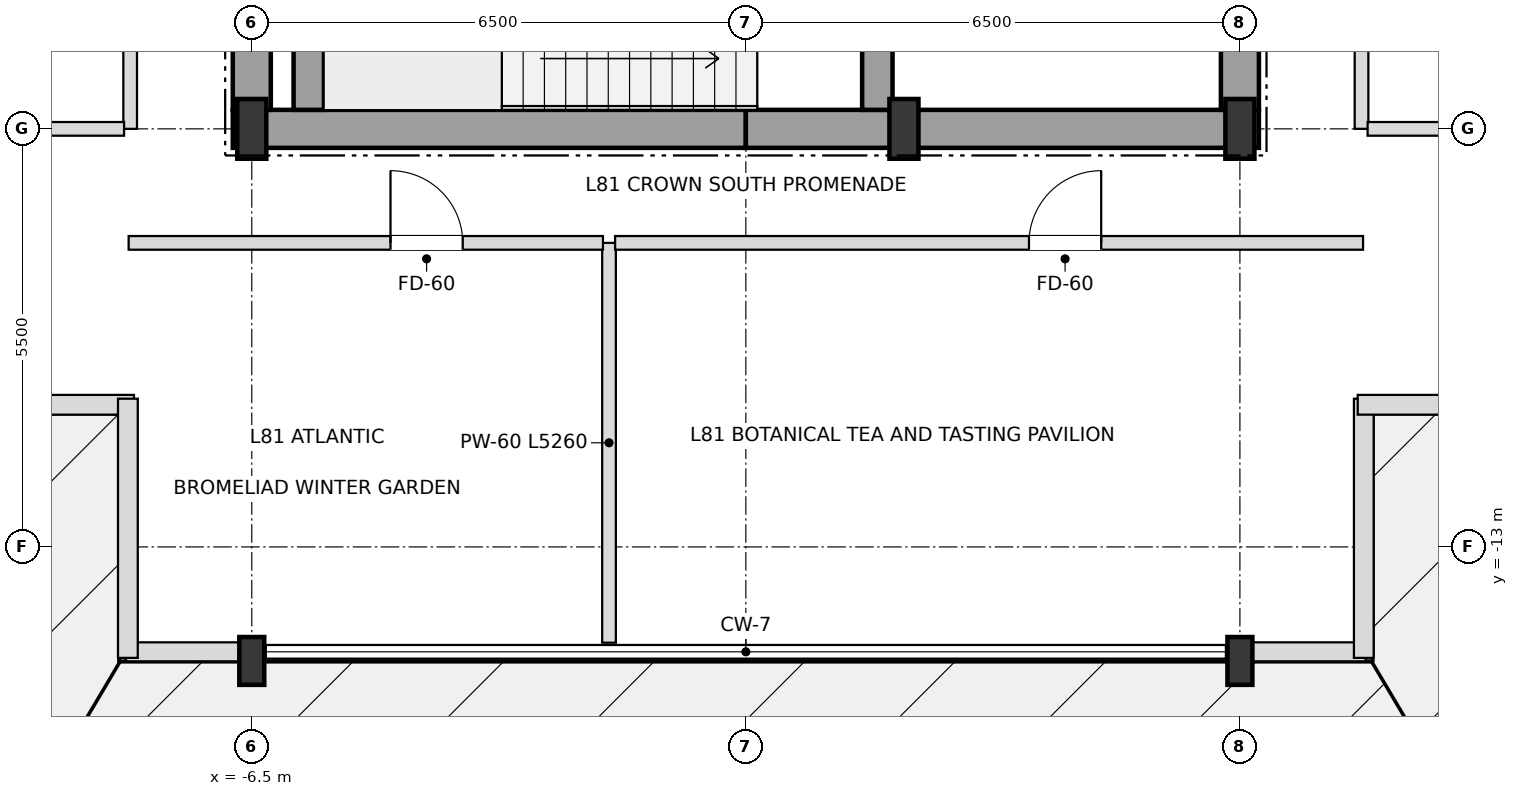
"""IFC4 building model, lengths in metres.
Left out: names, types, materials, properties, quantities, classifications, styles, units other than length and angle.
Written with IfcOpenShell. Run it as: python <this file> out.ifc"""

import sys

from ifc_helpers import new_model, si_unit, direction, frame, frame_2d, origin, origin_2d, place, context, subcontext, project, spatial, rectangle, i_section, extrude, element, fill, save


model = new_model("IFC4")
c1 = context("Model", 3, precision=1e-05, world=origin(), true_north=direction((0.0, 1.0)))
c2 = subcontext(c1, "Body", "Model", "MODEL_VIEW")
j1 = project(units=[si_unit("LENGTHUNIT", "METRE"), si_unit("PLANEANGLEUNIT", "RADIAN")], contexts=[c1])
p1 = place(None, origin())
s1 = spatial("IfcSite", under=j1, at=p1, CompositionType="ELEMENT")
p2 = place(p1, origin())
s2 = spatial("IfcBuilding", under=s1, at=p2, CompositionType="ELEMENT")
p3 = place(p2, frame((0.0, 0.0, 309.9)))
s3 = spatial("IfcBuildingStorey", under=s2, at=p3, CompositionType="ELEMENT", Elevation=309.9)
for number, where, z_axis, x_axis in (
    (1, (-6.5, -7.5, 0.0), (0.0, 0.0, 1.0), (1.0, 0.0, 0.0)),
    (2, (2.08, -7.5, 0.0), (0.0, 0.0, 1.0), (1.0, 0.0, 0.0)),
    (3, (6.5, -7.5, 0.0), (0.0, 0.0, 1.0), (1.0, 0.0, 0.0)),
):
    element("IfcColumn", number, at=place(p3, frame(where, z_axis=z_axis, x_axis=x_axis)), inside=s3, PredefinedType="COLUMN", context=c2, shape_type="SweptSolid", body=[
        extrude(i_section(OverallWidth=0.382, OverallDepth=0.786, WebThickness=0.02, FlangeThickness=0.033, at=origin_2d()), origin(), (0.0, 0.0, 1.0), 4.5),
    ])
for number, where, z_axis, x_axis in (
    (4, (-6.5, -14.5, 0.0), (0.0, 0.0, 1.0), (1.0, 0.0, 0.0)),
    (5, (6.5, -14.5, 0.0), (0.0, 0.0, 1.0), (1.0, 0.0, 0.0)),
):
    element("IfcColumn", number, at=place(p3, frame(where, z_axis=z_axis, x_axis=x_axis)), inside=s3, PredefinedType="COLUMN", context=c2, shape_type="SweptSolid", body=[
        extrude(i_section(OverallWidth=0.328, OverallDepth=0.629, WebThickness=0.014, FlangeThickness=0.021, at=origin_2d()), origin(), (0.0, 0.0, 1.0), 4.5),
    ])
for number, where, z_axis, x_axis in (
    (6, (-8.155, -14.38, 0.0), (0.0, 0.0, 1.0), (1.0, 0.0, 0.0)),
    (7, (6.659, -14.38, 0.0), (0.0, 0.0, 1.0), (1.0, 0.0, 0.0)),
):
    element("IfcWall", number, at=place(p3, frame(where, z_axis=z_axis, x_axis=x_axis)), inside=s3, PredefinedType="SOLIDWALL", context=c2, shape_type="SweptSolid", body=[
        extrude(rectangle(XDim=1.496, YDim=0.25, at=frame_2d((0.748, 0.0))), origin(), (0.0, 0.0, 1.0), 4.25),
    ])
for number, where, z_axis, x_axis in (
    (8, (-11.46, -11.13, 0.0), (0.0, 0.0, 1.0), (1.0, 0.0, 0.0)),
    (9, (-8.13, -11.05, 0.0), (0.0, 0.0, 1.0), (0.0, -1.0, 0.0)),
    (10, (8.13, -14.46, 0.0), (0.0, 0.0, 1.0), (0.0, 1.0, 0.0)),
    (11, (8.05, -11.13, 0.0), (0.0, 0.0, 1.0), (1.0, 0.0, 0.0)),
):
    element("IfcWall", number, at=place(p3, frame(where, z_axis=z_axis, x_axis=x_axis)), inside=s3, PredefinedType="SOLIDWALL", context=c2, shape_type="SweptSolid", body=[
        extrude(rectangle(XDim=3.41, YDim=0.26, at=frame_2d((1.705, 0.0))), origin(), (0.0, 0.0, 1.0), 4.25),
    ])
for number, where, z_axis, x_axis in (
    (12, (-6.75, -7.5, 0.0), (0.0, 0.0, 1.0), (1.0, 0.0, 0.0)),
    (13, (0.0, -7.5, 0.0), (0.0, 0.0, 1.0), (1.0, 0.0, 0.0)),
):
    element("IfcWall", number, at=place(p3, frame(where, z_axis=z_axis, x_axis=x_axis)), inside=s3, PredefinedType="SHEAR", context=c2, shape_type="SweptSolid", body=[
        extrude(rectangle(XDim=6.75, YDim=0.5, at=frame_2d((3.375, 0.0))), origin(), (0.0, 0.0, 1.0), 4.25),
    ])
p4 = place(p3, frame((-6.5, -7.25, 0.0), z_axis=(0.0, 0.0, 1.0), x_axis=(0.0, 1.0, 0.0)))
e14 = element("IfcWall", 14, at=p4, inside=s3, PredefinedType="SHEAR", context=c2, shape_type="SweptSolid", body=[
    extrude(rectangle(XDim=3.55, YDim=0.5, at=frame_2d((1.775, 0.0))), origin(), (0.0, 0.0, 1.0), 4.25),
])
p5 = place(p3, frame((6.5, -7.25, 0.0), z_axis=(0.0, 0.0, 1.0), x_axis=(0.0, 1.0, 0.0)))
e15 = element("IfcWall", 15, at=p5, inside=s3, PredefinedType="SHEAR", context=c2, shape_type="SweptSolid", body=[
    extrude(rectangle(XDim=5.75, YDim=0.5, at=frame_2d((2.875, 0.0))), origin(), (0.0, 0.0, 1.0), 4.25),
])
p6 = place(p5, frame((0.85, 0.0, 0.0)))
e16 = element("IfcOpeningElement", 16, at=p6, cuts=e15, PredefinedType="OPENING", context=c2, shape_type="SweptSolid", body=[
    extrude(rectangle(XDim=1.05, YDim=2.15, at=frame_2d((0.525, 1.075))), frame((0.0, 0.26, 0.0), z_axis=(0.0, -1.0, 0.0), x_axis=(1.0, 0.0, 0.0)), (0.0, 0.0, 1.0), 0.52),
])
p7 = place(p3, frame((-5.75, -7.25, 0.0), z_axis=(0.0, 0.0, 1.0), x_axis=(0.0, 1.0, 0.0)))
e17 = element("IfcWall", 17, at=p7, inside=s3, PredefinedType="SHEAR", context=c2, shape_type="SweptSolid", body=[
    extrude(rectangle(XDim=2.9, YDim=0.4, at=frame_2d((1.45, 0.0))), origin(), (0.0, 0.0, 1.0), 4.25),
])
p8 = place(p3, frame((1.73, -7.25, 0.0), z_axis=(0.0, 0.0, 1.0), x_axis=(0.0, 1.0, 0.0)))
e18 = element("IfcWall", 18, at=p8, inside=s3, PredefinedType="SHEAR", context=c2, shape_type="SweptSolid", body=[
    extrude(rectangle(XDim=3.3, YDim=0.4, at=frame_2d((1.65, 0.0))), origin(), (0.0, 0.0, 1.0), 4.25),
])
p9 = place(p8, frame((0.9, 0.0, 0.0)))
e19 = element("IfcOpeningElement", 19, at=p9, cuts=e18, PredefinedType="OPENING", context=c2, shape_type="SweptSolid", body=[
    extrude(rectangle(XDim=1.05, YDim=2.15, at=frame_2d((0.525, 1.075))), frame((0.0, 0.21, 0.0), z_axis=(0.0, -1.0, 0.0), x_axis=(1.0, 0.0, 0.0)), (0.0, 0.0, 1.0), 0.42),
])
p10 = place(p3, frame((-8.1, -7.5, 0.0), z_axis=(0.0, 0.0, 1.0), x_axis=(0.0, 1.0, 0.0)))
e20 = element("IfcWall", 20, at=p10, inside=s3, PredefinedType="PARTITIONING", context=c2, shape_type="SweptSolid", body=[
    extrude(rectangle(XDim=15.0, YDim=0.18, at=frame_2d((7.5, 0.0))), origin(), (0.0, 0.0, 1.0), 4.25),
])
p11 = place(p10, frame((4.525, 0.0, 0.0)))
e21 = element("IfcOpeningElement", 21, at=p11, cuts=e20, PredefinedType="OPENING", context=c2, shape_type="SweptSolid", body=[
    extrude(rectangle(XDim=0.95, YDim=2.15, at=frame_2d((0.475, 1.075))), frame((0.0, 0.1, 0.0), z_axis=(0.0, -1.0, 0.0), x_axis=(1.0, 0.0, 0.0)), (0.0, 0.0, 1.0), 0.2),
])
p12 = place(p3, frame((-1.8, -14.26, 0.0), z_axis=(0.0, 0.0, 1.0), x_axis=(0.0, 1.0, 0.0)))
e22 = element("IfcWall", 22, at=p12, inside=s3, PredefinedType="PARTITIONING", context=c2, shape_type="SweptSolid", body=[
    extrude(rectangle(XDim=5.26, YDim=0.18, at=frame_2d((2.63, 0.0))), origin(), (0.0, 0.0, 1.0), 4.25),
])
p13 = place(p3, frame((8.1, -7.5, 0.0), z_axis=(0.0, 0.0, 1.0), x_axis=(0.0, 1.0, 0.0)))
e23 = element("IfcWall", 23, at=p13, inside=s3, PredefinedType="PARTITIONING", context=c2, shape_type="SweptSolid", body=[
    extrude(rectangle(XDim=15.0, YDim=0.18, at=frame_2d((7.5, 0.0))), origin(), (0.0, 0.0, 1.0), 4.25),
])
p14 = place(p13, frame((4.525, 0.0, 0.0)))
e24 = element("IfcOpeningElement", 24, at=p14, cuts=e23, PredefinedType="OPENING", context=c2, shape_type="SweptSolid", body=[
    extrude(rectangle(XDim=0.95, YDim=2.15, at=frame_2d((0.475, 1.075))), frame((0.0, 0.1, 0.0), z_axis=(0.0, -1.0, 0.0), x_axis=(1.0, 0.0, 0.0)), (0.0, 0.0, 1.0), 0.2),
])
p15 = place(p13, frame((11.825, 0.0, 0.0)))
e25 = element("IfcOpeningElement", 25, at=p15, cuts=e23, PredefinedType="OPENING", context=c2, shape_type="SweptSolid", body=[
    extrude(rectangle(XDim=0.95, YDim=2.15, at=frame_2d((0.475, 1.075))), frame((0.0, 0.1, 0.0), z_axis=(0.0, -1.0, 0.0), x_axis=(1.0, 0.0, 0.0)), (0.0, 0.0, 1.0), 0.2),
])
p16 = place(p3, frame((-8.12, -9.0, 0.0), z_axis=(0.0, 0.0, 1.0), x_axis=(1.0, 0.0, 0.0)))
e26 = element("IfcWall", 26, at=p16, inside=s3, PredefinedType="PARTITIONING", context=c2, shape_type="SweptSolid", body=[
    extrude(rectangle(XDim=6.24, YDim=0.18, at=frame_2d((3.12, 0.0))), origin(), (0.0, 0.0, 1.0), 4.25),
])
p17 = place(p16, frame((3.445, 0.0, 0.0)))
e27 = element("IfcOpeningElement", 27, at=p17, cuts=e26, PredefinedType="OPENING", context=c2, shape_type="SweptSolid", body=[
    extrude(rectangle(XDim=0.95, YDim=2.15, at=frame_2d((0.475, 1.075))), frame((0.0, 0.1, 0.0), z_axis=(0.0, -1.0, 0.0), x_axis=(1.0, 0.0, 0.0)), (0.0, 0.0, 1.0), 0.2),
])
p18 = place(p3, frame((-1.72, -9.0, 0.0), z_axis=(0.0, 0.0, 1.0), x_axis=(1.0, 0.0, 0.0)))
e28 = element("IfcWall", 28, at=p18, inside=s3, PredefinedType="PARTITIONING", context=c2, shape_type="SweptSolid", body=[
    extrude(rectangle(XDim=9.84, YDim=0.18, at=frame_2d((4.92, 0.0))), origin(), (0.0, 0.0, 1.0), 4.25),
])
p19 = place(p18, frame((5.445, 0.0, 0.0)))
e29 = element("IfcOpeningElement", 29, at=p19, cuts=e28, PredefinedType="OPENING", context=c2, shape_type="SweptSolid", body=[
    extrude(rectangle(XDim=0.95, YDim=2.15, at=frame_2d((0.475, 1.075))), frame((0.0, 0.1, 0.0), z_axis=(0.0, -1.0, 0.0), x_axis=(1.0, 0.0, 0.0)), (0.0, 0.0, 1.0), 0.2),
])
for number, where, z_axis, x_axis in (
    (30, (-11.245, -7.5, 0.0), (0.0, 0.0, 1.0), (1.0, 0.0, 0.0)),
    (31, (8.18, -7.5, 0.0), (0.0, 0.0, 1.0), (1.0, 0.0, 0.0)),
):
    element("IfcWall", number, at=place(p3, frame(where, z_axis=z_axis, x_axis=x_axis)), inside=s3, PredefinedType="PARTITIONING", context=c2, shape_type="SweptSolid", body=[
        extrude(rectangle(XDim=3.065, YDim=0.18, at=frame_2d((1.533, 0.0))), origin(), (0.0, 0.0, 1.0), 3.918),
    ])
p20 = place(p17, origin())
e32 = element("IfcDoor", 32, at=p20, inside=s3, OperationType="SINGLE_SWING_LEFT", PredefinedType="DOOR", context=c2, shape_type="SweptSolid", body=[
    extrude(rectangle(XDim=0.95, YDim=2.15, at=frame_2d((0.475, 1.075))), frame((0.0, 0.025, 0.0), z_axis=(0.0, -1.0, 0.0), x_axis=(1.0, 0.0, 0.0)), (0.0, 0.0, 1.0), 0.05),
])
fill(e27, e32)
p21 = place(p19, origin())
e33 = element("IfcDoor", 33, at=p21, inside=s3, OperationType="SINGLE_SWING_RIGHT", PredefinedType="DOOR", context=c2, shape_type="SweptSolid", body=[
    extrude(rectangle(XDim=0.95, YDim=2.15, at=frame_2d((0.475, 1.075))), frame((0.0, 0.025, 0.0), z_axis=(0.0, -1.0, 0.0), x_axis=(1.0, 0.0, 0.0)), (0.0, 0.0, 1.0), 0.05),
])
fill(e29, e33)
save(model, sys.argv[1])
